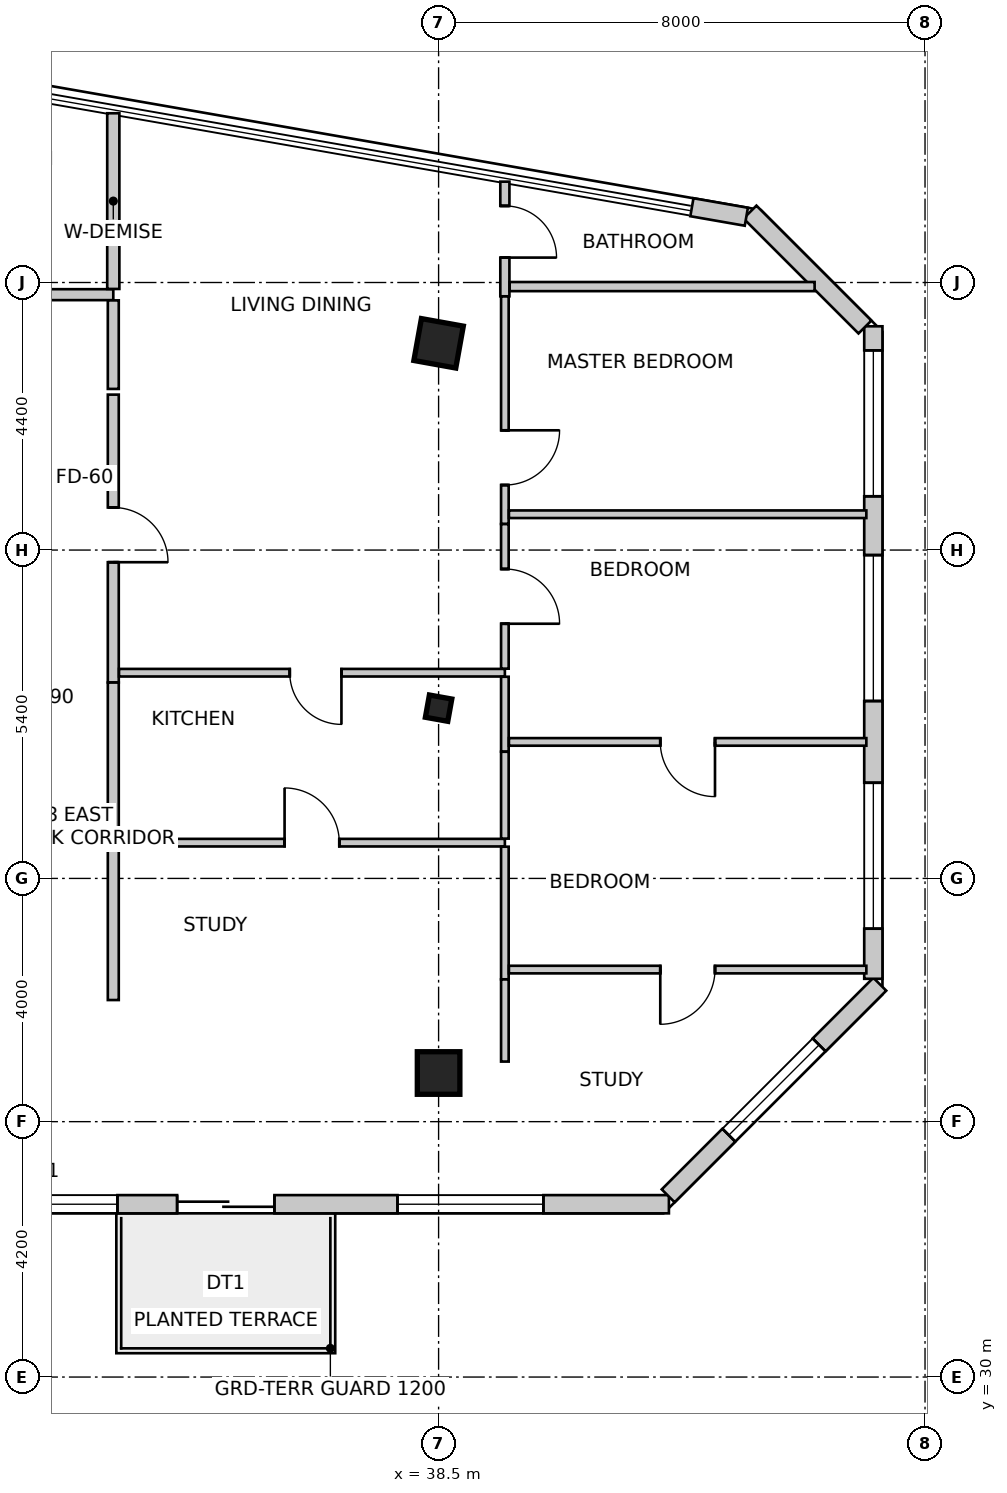
"""IFC4 building model, lengths in metres.
Left out: names, types, materials, properties, quantities, classifications, styles, units other than length and angle.
Written with IfcOpenShell. Run it as: python <this file> out.ifc"""

import sys

from ifc_helpers import new_model, si_unit, direction, frame, frame_2d, origin, origin_2d, place, context, subcontext, project, spatial, rectangle, i_section, extrude, source, transform, mapped, element, fill, save


model = new_model("IFC4")
c1 = context("Model", 3, precision=1e-05, world=origin(), true_north=direction((0.0, 1.0)))
c2 = subcontext(c1, "Body", "Model", "MODEL_VIEW")
j1 = project(units=[si_unit("LENGTHUNIT", "METRE"), si_unit("PLANEANGLEUNIT", "RADIAN")], contexts=[c1])
p1 = place(None, origin())
s1 = spatial("IfcSite", under=j1, at=p1, CompositionType="ELEMENT")
p2 = place(p1, origin())
s2 = spatial("IfcBuilding", under=s1, at=p2, CompositionType="ELEMENT")
p3 = place(p2, frame((0.0, 0.0, 228.9)))
s3 = spatial("IfcBuildingStorey", under=s2, at=p3, CompositionType="ELEMENT", Elevation=228.9)
m1 = source(origin(), c2, "Body", "SweptSolid", [
    extrude(rectangle(XDim=0.7, YDim=0.7, at=origin_2d()), origin(), (0.0, 0.0, 1.0), 3.5),
])
for number, where, z_axis, x_axis in (
    (1, (38.5, 47.0, 0.0), (0.0, 0.0, 1.0), (0.984, -0.177, 0.0)),
    (2, (38.5, 35.0, 0.0), (0.0, 0.0, 1.0), (1.0, 0.0, 0.0)),
):
    element("IfcColumn", number, at=place(p3, frame(where, z_axis=z_axis, x_axis=x_axis)), inside=s3, PredefinedType="COLUMN", context=c2, shape_type="MappedRepresentation", body=[
        mapped(m1, transform((0.0, 0.0, 0.0), scale=1.0)),
    ])
m2 = source(origin(), c2, "Body", "SweptSolid", [
    extrude(i_section(OverallWidth=0.374, OverallDepth=0.372, WebThickness=0.016, FlangeThickness=0.026, FilletRadius=0.015, at=origin_2d()), origin(), (0.0, 0.0, 1.0), 3.5),
])
p4 = place(p3, frame((38.5, 41.0, 0.0), z_axis=(0.0, 0.0, 1.0), x_axis=(0.984195607969, -0.17708474032, 0.0)))
e3 = element("IfcColumn", 3, at=p4, inside=s3, PredefinedType="COLUMN", context=c2, shape_type="MappedRepresentation", body=[
    mapped(m2, transform((0.0, 0.0, 0.0), scale=1.0)),
])
p5 = place(p3, frame((29.797, 32.842, 0.0), z_axis=(0.0, 0.0, 1.0), x_axis=(1.0, 0.0, 0.0)))
e4 = element("IfcWall", 4, at=p5, inside=s3, PredefinedType="SOLIDWALL", context=c2, shape_type="SweptSolid", body=[
    extrude(rectangle(XDim=12.491, YDim=0.3, at=frame_2d((6.245, 0.0))), origin(), (0.0, 0.0, 1.0), 3.25),
])
m3 = source(origin(), c2, "Body", "SweptSolid", [
    extrude(rectangle(XDim=1.6, YDim=2.15, at=frame_2d((0.8, 1.075))), frame((0.0, 0.16, 0.0), z_axis=(0.0, -1.0, 0.0), x_axis=(1.0, 0.0, 0.0)), (0.0, 0.0, 1.0), 0.32),
])
p6 = place(p5, frame((4.403, 0.0, 0.0)))
e5 = element("IfcOpeningElement", 5, at=p6, cuts=e4, PredefinedType="OPENING", context=c2, shape_type="MappedRepresentation", body=[
    mapped(m3, transform((0.0, 0.0, 0.0), scale=1.0)),
])
m4 = source(origin(), c2, "Body", "SweptSolid", [
    extrude(rectangle(XDim=2.4, YDim=2.2, at=frame_2d((1.2, 1.1))), frame((0.0, 0.16, 0.0), z_axis=(0.0, -1.0, 0.0), x_axis=(1.0, 0.0, 0.0)), (0.0, 0.0, 1.0), 0.32),
])
p7 = place(p5, frame((1.021, 0.0, 0.85)))
e6 = element("IfcOpeningElement", 6, at=p7, cuts=e4, PredefinedType="OPENING", context=c2, shape_type="MappedRepresentation", body=[
    mapped(m4, transform((0.0, 0.0, 0.0), scale=1.0)),
])
p8 = place(p5, frame((8.027, 0.0, 0.85)))
e7 = element("IfcOpeningElement", 7, at=p8, cuts=e4, PredefinedType="OPENING", context=c2, shape_type="MappedRepresentation", body=[
    mapped(m4, transform((0.0, 0.0, 0.0), scale=1.0)),
])
p9 = place(p3, frame((42.276, 32.98, 0.0), z_axis=(0.0, 0.0, 1.0), x_axis=(0.707106781187, 0.707106781187, 0.0)))
e8 = element("IfcWall", 8, at=p9, inside=s3, PredefinedType="SOLIDWALL", context=c2, shape_type="SweptSolid", body=[
    extrude(rectangle(XDim=4.922, YDim=0.3, at=frame_2d((2.461, 0.0))), origin(), (0.0, 0.0, 1.0), 3.25),
])
m5 = source(origin(), c2, "Body", "SweptSolid", [
    extrude(rectangle(XDim=2.1, YDim=2.0, at=frame_2d((1.05, 1.0))), frame((0.0, 0.16, 0.0), z_axis=(0.0, -1.0, 0.0), x_axis=(1.0, 0.0, 0.0)), (0.0, 0.0, 1.0), 0.32),
])
p10 = place(p9, frame((1.411, 0.0, 0.85)))
e9 = element("IfcOpeningElement", 9, at=p10, cuts=e8, PredefinedType="OPENING", context=c2, shape_type="MappedRepresentation", body=[
    mapped(m5, transform((0.0, 0.0, 0.0), scale=1.0)),
])
p11 = place(p3, frame((45.65, 36.549, 0.0), z_axis=(0.0, 0.0, 1.0), x_axis=(0.0, 1.0, 0.0)))
e10 = element("IfcWall", 10, at=p11, inside=s3, PredefinedType="SOLIDWALL", context=c2, shape_type="SweptSolid", body=[
    extrude(rectangle(XDim=10.73, YDim=0.3, at=frame_2d((5.365, 0.0))), origin(), (0.0, 0.0, 1.0), 3.25),
])
p12 = place(p11, frame((0.824, 0.0, 0.85)))
e11 = element("IfcOpeningElement", 11, at=p12, cuts=e10, PredefinedType="OPENING", context=c2, shape_type="MappedRepresentation", body=[
    mapped(m4, transform((0.0, 0.0, 0.0), scale=1.0)),
])
p13 = place(p11, frame((4.568, 0.0, 0.85)))
e12 = element("IfcOpeningElement", 12, at=p13, cuts=e10, PredefinedType="OPENING", context=c2, shape_type="MappedRepresentation", body=[
    mapped(m4, transform((0.0, 0.0, 0.0), scale=1.0)),
])
p14 = place(p11, frame((7.935, 0.0, 0.85)))
e13 = element("IfcOpeningElement", 13, at=p14, cuts=e10, PredefinedType="OPENING", context=c2, shape_type="MappedRepresentation", body=[
    mapped(m4, transform((0.0, 0.0, 0.0), scale=1.0)),
])
p15 = place(p3, frame((45.512, 47.268, 0.0), z_axis=(0.0, 0.0, 1.0), x_axis=(-0.707106781187, 0.707106781187, 0.0)))
e14 = element("IfcWall", 14, at=p15, inside=s3, PredefinedType="SOLIDWALL", context=c2, shape_type="SweptSolid", body=[
    extrude(rectangle(XDim=2.674, YDim=0.3, at=frame_2d((1.337, 0.0))), origin(), (0.0, 0.0, 1.0), 3.25),
])
p16 = place(p3, frame((43.561, 49.081, 0.0), z_axis=(0.0, 0.0, 1.0), x_axis=(-0.985063518612, 0.172191359539, 0.0)))
e15 = element("IfcWall", 15, at=p16, inside=s3, PredefinedType="SOLIDWALL", context=c2, shape_type="SweptSolid", body=[
    extrude(rectangle(XDim=0.909, YDim=0.3, at=frame_2d((0.455, 0.0))), origin(), (0.0, 0.0, 1.0), 3.25),
])
p17 = place(p3, frame((28.362, 47.8, 0.0), z_axis=(0.0, 0.0, 1.0), x_axis=(1.0, 0.0, 0.0)))
e16 = element("IfcWall", 16, at=p17, inside=s3, PredefinedType="PARTITIONING", context=c2, shape_type="SweptSolid", body=[
    extrude(rectangle(XDim=4.788, YDim=0.18, at=frame_2d((2.394, 0.0))), origin(), (0.0, 0.0, 1.0), 2.779),
])
m6 = source(origin(), c2, "Body", "SweptSolid", [
    extrude(rectangle(XDim=0.85, YDim=2.15, at=frame_2d((0.425, 1.075))), frame((0.0, 0.1, 0.0), z_axis=(0.0, -1.0, 0.0), x_axis=(1.0, 0.0, 0.0)), (0.0, 0.0, 1.0), 0.2),
])
p18 = place(p17, frame((0.401, 0.0, 0.0)))
e17 = element("IfcOpeningElement", 17, at=p18, cuts=e16, PredefinedType="OPENING", context=c2, shape_type="MappedRepresentation", body=[
    mapped(m6, transform((0.0, 0.0, 0.0), scale=1.0)),
])
p19 = place(p3, frame((33.15, 47.706, 0.0), z_axis=(0.0, 0.0, 1.0), x_axis=(0.0, -1.0, 0.0)))
e18 = element("IfcWall", 18, at=p19, inside=s3, PredefinedType="PARTITIONING", context=c2, shape_type="SweptSolid", body=[
    extrude(rectangle(XDim=1.456, YDim=0.18, at=frame_2d((0.728, 0.0))), origin(), (0.0, 0.0, 1.0), 2.919),
])
p20 = place(p3, frame((33.15, 38.948, 0.0), z_axis=(0.0, 0.0, 1.0), x_axis=(0.0, -1.0, 0.0)))
e19 = element("IfcWall", 19, at=p20, inside=s3, PredefinedType="PARTITIONING", context=c2, shape_type="SweptSolid", body=[
    extrude(rectangle(XDim=2.748, YDim=0.18, at=frame_2d((1.374, 0.0))), origin(), (0.0, 0.0, 1.0), 3.25),
])
p21 = place(p3, frame((33.15, 46.156, 0.0), z_axis=(0.0, 0.0, 1.0), x_axis=(0.0, -1.0, 0.0)))
e20 = element("IfcWall", 20, at=p21, inside=s3, PredefinedType="PARTITIONING", context=c2, shape_type="SweptSolid", body=[
    extrude(rectangle(XDim=4.733, YDim=0.18, at=frame_2d((2.366, 0.0))), origin(), (0.0, 0.0, 1.0), 2.779),
])
m7 = source(origin(), c2, "Body", "SweptSolid", [
    extrude(rectangle(XDim=0.9, YDim=2.15, at=frame_2d((0.45, 1.075))), frame((0.0, 0.1, 0.0), z_axis=(0.0, -1.0, 0.0), x_axis=(1.0, 0.0, 0.0)), (0.0, 0.0, 1.0), 0.2),
])
p22 = place(p21, frame((1.856, 0.0, 0.0)))
e21 = element("IfcOpeningElement", 21, at=p22, cuts=e20, PredefinedType="OPENING", context=c2, shape_type="MappedRepresentation", body=[
    mapped(m7, transform((0.0, 0.0, 0.0), scale=1.0)),
])
p23 = place(p3, frame((33.15, 41.421, 0.0), z_axis=(0.0, 0.0, 1.0), x_axis=(0.0, -1.0, 0.0)))
e22 = element("IfcWall", 22, at=p23, inside=s3, PredefinedType="PARTITIONING", context=c2, shape_type="SweptSolid", body=[
    extrude(rectangle(XDim=2.471, YDim=0.18, at=frame_2d((1.235, 0.0))), origin(), (0.0, 0.0, 1.0), 3.25),
])
p24 = place(p3, frame((33.15, 50.783, 0.0), z_axis=(0.0, 0.0, 1.0), x_axis=(0.0, -1.0, 0.0)))
e23 = element("IfcWall", 23, at=p24, inside=s3, PredefinedType="PARTITIONING", context=c2, shape_type="SweptSolid", body=[
    extrude(rectangle(XDim=2.889, YDim=0.2, at=frame_2d((1.445, 0.0))), origin(), (0.0, 0.0, 1.0), 2.542),
])
p25 = place(p3, frame((33.244, 38.788, 0.0), z_axis=(0.0, 0.0, 1.0), x_axis=(1.0, 0.0, 0.0)))
e24 = element("IfcWall", 24, at=p25, inside=s3, PredefinedType="PARTITIONING", context=c2, shape_type="SweptSolid", body=[
    extrude(rectangle(XDim=6.346, YDim=0.125, at=frame_2d((3.173, 0.0))), origin(), (0.0, 0.0, 1.0), 2.766),
])
m8 = source(origin(), c2, "Body", "SweptSolid", [
    extrude(rectangle(XDim=0.9, YDim=2.15, at=frame_2d((0.45, 1.075))), frame((0.0, 0.073, 0.0), z_axis=(0.0, -1.0, 0.0), x_axis=(1.0, 0.0, 0.0)), (0.0, 0.0, 1.0), 0.145),
])
p26 = place(p25, frame((2.723, 0.0, 0.0)))
e25 = element("IfcOpeningElement", 25, at=p26, cuts=e24, PredefinedType="OPENING", context=c2, shape_type="MappedRepresentation", body=[
    mapped(m8, transform((0.0, 0.0, 0.0), scale=1.0)),
])
p27 = place(p3, frame((39.59, 38.721, 0.0), z_axis=(0.0, 0.0, 1.0), x_axis=(0.0, -1.0, 0.0)))
e26 = element("IfcWall", 26, at=p27, inside=s3, PredefinedType="PARTITIONING", context=c2, shape_type="SweptSolid", body=[
    extrude(rectangle(XDim=2.18, YDim=0.125, at=frame_2d((1.09, 0.0))), origin(), (0.0, 0.0, 1.0), 3.25),
])
p28 = place(p3, frame((39.59, 36.539, 0.0), z_axis=(0.0, 0.0, 1.0), x_axis=(0.0, -1.0, 0.0)))
e27 = element("IfcWall", 27, at=p28, inside=s3, PredefinedType="PARTITIONING", context=c2, shape_type="SweptSolid", body=[
    extrude(rectangle(XDim=1.351, YDim=0.125, at=frame_2d((0.676, 0.0))), origin(), (0.0, 0.0, 1.0), 3.25),
])
p29 = place(p3, frame((39.59, 41.583, 0.0), z_axis=(0.0, 0.0, 1.0), x_axis=(-1.0, 0.0, 0.0)))
e28 = element("IfcWall", 28, at=p29, inside=s3, PredefinedType="PARTITIONING", context=c2, shape_type="SweptSolid", body=[
    extrude(rectangle(XDim=6.346, YDim=0.125, at=frame_2d((3.173, 0.0))), origin(), (0.0, 0.0, 1.0), 2.766),
])
m9 = source(origin(), c2, "Body", "SweptSolid", [
    extrude(rectangle(XDim=0.85, YDim=2.15, at=frame_2d((0.425, 1.075))), frame((0.0, 0.073, 0.0), z_axis=(0.0, -1.0, 0.0), x_axis=(1.0, 0.0, 0.0)), (0.0, 0.0, 1.0), 0.145),
])
p30 = place(p29, frame((2.688, 0.0, 0.0)))
e29 = element("IfcOpeningElement", 29, at=p30, cuts=e28, PredefinedType="OPENING", context=c2, shape_type="MappedRepresentation", body=[
    mapped(m9, transform((0.0, 0.0, 0.0), scale=1.0)),
])
p31 = place(p3, frame((39.59, 49.658, 0.0), z_axis=(0.0, 0.0, 1.0), x_axis=(0.0, -1.0, 0.0)))
e30 = element("IfcWall", 30, at=p31, inside=s3, PredefinedType="PARTITIONING", context=c2, shape_type="SweptSolid", body=[
    extrude(rectangle(XDim=1.885, YDim=0.15, at=frame_2d((0.943, 0.0))), origin(), (0.0, 0.0, 1.0), 3.25),
])
m10 = source(origin(), c2, "Body", "SweptSolid", [
    extrude(rectangle(XDim=0.85, YDim=2.15, at=frame_2d((0.425, 1.075))), frame((0.0, 0.085, 0.0), z_axis=(0.0, -1.0, 0.0), x_axis=(1.0, 0.0, 0.0)), (0.0, 0.0, 1.0), 0.17),
])
p32 = place(p31, frame((0.399, 0.0, 0.0)))
e31 = element("IfcOpeningElement", 31, at=p32, cuts=e30, PredefinedType="OPENING", context=c2, shape_type="MappedRepresentation", body=[
    mapped(m10, transform((0.0, 0.0, 0.0), scale=1.0)),
])
p33 = place(p3, frame((39.59, 47.771, 0.0), z_axis=(0.0, 0.0, 1.0), x_axis=(0.0, -1.0, 0.0)))
e32 = element("IfcWall", 32, at=p33, inside=s3, PredefinedType="PARTITIONING", context=c2, shape_type="SweptSolid", body=[
    extrude(rectangle(XDim=3.742, YDim=0.125, at=frame_2d((1.871, 0.0))), origin(), (0.0, 0.0, 1.0), 3.25),
])
p34 = place(p33, frame((2.202, 0.0, 0.0)))
e33 = element("IfcOpeningElement", 33, at=p34, cuts=e32, PredefinedType="OPENING", context=c2, shape_type="MappedRepresentation", body=[
    mapped(m8, transform((0.0, 0.0, 0.0), scale=1.0)),
])
p35 = place(p3, frame((39.59, 44.027, 0.0), z_axis=(0.0, 0.0, 1.0), x_axis=(0.0, -1.0, 0.0)))
e34 = element("IfcWall", 34, at=p35, inside=s3, PredefinedType="PARTITIONING", context=c2, shape_type="SweptSolid", body=[
    extrude(rectangle(XDim=2.378, YDim=0.125, at=frame_2d((1.189, 0.0))), origin(), (0.0, 0.0, 1.0), 3.25),
])
p36 = place(p35, frame((0.739, 0.0, 0.0)))
e35 = element("IfcOpeningElement", 35, at=p36, cuts=e34, PredefinedType="OPENING", context=c2, shape_type="MappedRepresentation", body=[
    mapped(m8, transform((0.0, 0.0, 0.0), scale=1.0)),
])
p37 = place(p3, frame((39.59, 41.517, 0.0), z_axis=(0.0, 0.0, 1.0), x_axis=(0.0, -1.0, 0.0)))
e36 = element("IfcWall", 36, at=p37, inside=s3, PredefinedType="PARTITIONING", context=c2, shape_type="SweptSolid", body=[
    extrude(rectangle(XDim=1.232, YDim=0.125, at=frame_2d((0.616, 0.0))), origin(), (0.0, 0.0, 1.0), 3.25),
])
p38 = place(p3, frame((39.59, 40.283, 0.0), z_axis=(0.0, 0.0, 1.0), x_axis=(0.0, -1.0, 0.0)))
e37 = element("IfcWall", 37, at=p38, inside=s3, PredefinedType="PARTITIONING", context=c2, shape_type="SweptSolid", body=[
    extrude(rectangle(XDim=1.428, YDim=0.125, at=frame_2d((0.714, 0.0))), origin(), (0.0, 0.0, 1.0), 3.25),
])
p39 = place(p3, frame((44.684, 47.933, 0.0), z_axis=(0.0, 0.0, 1.0), x_axis=(-1.0, 0.0, 0.0)))
e38 = element("IfcWall", 38, at=p39, inside=s3, PredefinedType="PARTITIONING", context=c2, shape_type="SweptSolid", body=[
    extrude(rectangle(XDim=5.015, YDim=0.15, at=frame_2d((2.508, 0.0))), origin(), (0.0, 0.0, 1.0), 3.25),
])
p40 = place(p3, frame((45.535, 44.189, 0.0), z_axis=(0.0, 0.0, 1.0), x_axis=(-1.0, 0.0, 0.0)))
e39 = element("IfcWall", 39, at=p40, inside=s3, PredefinedType="PARTITIONING", context=c2, shape_type="SweptSolid", body=[
    extrude(rectangle(XDim=5.878, YDim=0.125, at=frame_2d((2.939, 0.0))), origin(), (0.0, 0.0, 1.0), 3.25),
])
p41 = place(p3, frame((45.535, 40.445, 0.0), z_axis=(0.0, 0.0, 1.0), x_axis=(-1.0, 0.0, 0.0)))
e40 = element("IfcWall", 40, at=p41, inside=s3, PredefinedType="PARTITIONING", context=c2, shape_type="SweptSolid", body=[
    extrude(rectangle(XDim=5.878, YDim=0.125, at=frame_2d((2.939, 0.0))), origin(), (0.0, 0.0, 1.0), 3.25),
])
p42 = place(p41, frame((2.489, 0.0, 0.0)))
e41 = element("IfcOpeningElement", 41, at=p42, cuts=e40, PredefinedType="OPENING", context=c2, shape_type="MappedRepresentation", body=[
    mapped(m8, transform((0.0, 0.0, 0.0), scale=1.0)),
])
p43 = place(p3, frame((45.535, 36.701, 0.0), z_axis=(0.0, 0.0, 1.0), x_axis=(-1.0, 0.0, 0.0)))
e42 = element("IfcWall", 42, at=p43, inside=s3, PredefinedType="PARTITIONING", context=c2, shape_type="SweptSolid", body=[
    extrude(rectangle(XDim=5.878, YDim=0.125, at=frame_2d((2.939, 0.0))), origin(), (0.0, 0.0, 1.0), 3.25),
])
p44 = place(p43, frame((2.489, 0.0, 0.0)))
e43 = element("IfcOpeningElement", 43, at=p44, cuts=e42, PredefinedType="OPENING", context=c2, shape_type="MappedRepresentation", body=[
    mapped(m8, transform((0.0, 0.0, 0.0), scale=1.0)),
])
m11 = source(origin(), c2, "Body", "SweptSolid", [
    extrude(rectangle(XDim=1.6, YDim=2.15, at=frame_2d((0.8, 1.075))), frame((0.0, 0.025, 0.0), z_axis=(0.0, -1.0, 0.0), x_axis=(1.0, 0.0, 0.0)), (0.0, 0.0, 1.0), 0.05),
])
p45 = place(p6, origin())
e44 = element("IfcDoor", 44, at=p45, inside=s3, OperationType="DOUBLE_DOOR_SLIDING", PredefinedType="DOOR", context=c2, shape_type="MappedRepresentation", body=[
    mapped(m11, transform((0.0, 0.0, 0.0), scale=1.0)),
])
fill(e5, e44)
m12 = source(origin(), c2, "Body", "SweptSolid", [
    extrude(rectangle(XDim=2.4, YDim=2.2, at=frame_2d((1.2, 1.1))), frame((0.0, -0.015, 0.0), z_axis=(0.0, -1.0, 0.0), x_axis=(1.0, 0.0, 0.0)), (0.0, 0.0, 1.0), 0.06),
])
p46 = place(p7, origin())
e45 = element("IfcWindow", 45, at=p46, inside=s3, PartitioningType="SINGLE_PANEL", PredefinedType="WINDOW", context=c2, shape_type="MappedRepresentation", body=[
    mapped(m12, transform((0.0, 0.0, 0.0), scale=1.0)),
])
fill(e6, e45)
p47 = place(p8, origin())
e46 = element("IfcWindow", 46, at=p47, inside=s3, PartitioningType="SINGLE_PANEL", PredefinedType="WINDOW", context=c2, shape_type="MappedRepresentation", body=[
    mapped(m12, transform((0.0, 0.0, 0.0), scale=1.0)),
])
fill(e7, e46)
m13 = source(origin(), c2, "Body", "SweptSolid", [
    extrude(rectangle(XDim=2.1, YDim=2.0, at=frame_2d((1.05, 1.0))), frame((0.0, -0.015, 0.0), z_axis=(0.0, -1.0, 0.0), x_axis=(1.0, 0.0, 0.0)), (0.0, 0.0, 1.0), 0.06),
])
p48 = place(p10, origin())
e47 = element("IfcWindow", 47, at=p48, inside=s3, PartitioningType="SINGLE_PANEL", PredefinedType="WINDOW", context=c2, shape_type="MappedRepresentation", body=[
    mapped(m13, transform((0.0, 0.0, 0.0), scale=1.0)),
])
fill(e9, e47)
p49 = place(p12, origin())
e48 = element("IfcWindow", 48, at=p49, inside=s3, PartitioningType="SINGLE_PANEL", PredefinedType="WINDOW", context=c2, shape_type="MappedRepresentation", body=[
    mapped(m12, transform((0.0, 0.0, 0.0), scale=1.0)),
])
fill(e11, e48)
p50 = place(p13, origin())
e49 = element("IfcWindow", 49, at=p50, inside=s3, PartitioningType="SINGLE_PANEL", PredefinedType="WINDOW", context=c2, shape_type="MappedRepresentation", body=[
    mapped(m12, transform((0.0, 0.0, 0.0), scale=1.0)),
])
fill(e12, e49)
p51 = place(p14, origin())
e50 = element("IfcWindow", 50, at=p51, inside=s3, PartitioningType="SINGLE_PANEL", PredefinedType="WINDOW", context=c2, shape_type="MappedRepresentation", body=[
    mapped(m12, transform((0.0, 0.0, 0.0), scale=1.0)),
])
fill(e13, e50)
m14 = source(origin(), c2, "Body", "SweptSolid", [
    extrude(rectangle(XDim=0.9, YDim=2.15, at=frame_2d((0.45, 1.075))), frame((0.0, 0.025, 0.0), z_axis=(0.0, -1.0, 0.0), x_axis=(1.0, 0.0, 0.0)), (0.0, 0.0, 1.0), 0.05),
])
p52 = place(p26, origin())
e51 = element("IfcDoor", 51, at=p52, inside=s3, OperationType="SINGLE_SWING_LEFT", PredefinedType="DOOR", context=c2, shape_type="MappedRepresentation", body=[
    mapped(m14, transform((0.0, 0.0, 0.0), scale=1.0)),
])
fill(e25, e51)
m15 = source(origin(), c2, "Body", "SweptSolid", [
    extrude(rectangle(XDim=0.9, YDim=2.15, at=frame_2d((0.45, 1.075))), frame((0.0, 0.025, 0.0), z_axis=(0.0, -1.0, 0.0), x_axis=(1.0, 0.0, 0.0)), (0.0, 0.0, 1.0), 0.05),
])
p53 = place(p22, origin())
e52 = element("IfcDoor", 52, at=p53, inside=s3, OperationType="SINGLE_SWING_RIGHT", PredefinedType="DOOR", context=c2, shape_type="MappedRepresentation", body=[
    mapped(m15, transform((0.0, 0.0, 0.0), scale=1.0)),
])
fill(e21, e52)
m16 = source(origin(), c2, "Body", "SweptSolid", [
    extrude(rectangle(XDim=0.85, YDim=2.15, at=frame_2d((0.425, 1.075))), frame((0.0, 0.025, 0.0), z_axis=(0.0, -1.0, 0.0), x_axis=(1.0, 0.0, 0.0)), (0.0, 0.0, 1.0), 0.05),
])
p54 = place(p30, origin())
e53 = element("IfcDoor", 53, at=p54, inside=s3, OperationType="SINGLE_SWING_LEFT", PredefinedType="DOOR", context=c2, shape_type="MappedRepresentation", body=[
    mapped(m16, transform((0.0, 0.0, 0.0), scale=1.0)),
])
fill(e29, e53)
p55 = place(p32, origin())
e54 = element("IfcDoor", 54, at=p55, inside=s3, OperationType="SINGLE_SWING_RIGHT", PredefinedType="DOOR", context=c2, shape_type="MappedRepresentation", body=[
    mapped(m16, transform((0.0, 0.0, 0.0), scale=1.0)),
])
fill(e31, e54)
p56 = place(p34, origin())
e55 = element("IfcDoor", 55, at=p56, inside=s3, OperationType="SINGLE_SWING_LEFT", PredefinedType="DOOR", context=c2, shape_type="MappedRepresentation", body=[
    mapped(m14, transform((0.0, 0.0, 0.0), scale=1.0)),
])
fill(e33, e55)
p57 = place(p36, origin())
e56 = element("IfcDoor", 56, at=p57, inside=s3, OperationType="SINGLE_SWING_RIGHT", PredefinedType="DOOR", context=c2, shape_type="MappedRepresentation", body=[
    mapped(m14, transform((0.0, 0.0, 0.0), scale=1.0)),
])
fill(e35, e56)
p58 = place(p42, origin())
e57 = element("IfcDoor", 57, at=p58, inside=s3, OperationType="SINGLE_SWING_LEFT", PredefinedType="DOOR", context=c2, shape_type="MappedRepresentation", body=[
    mapped(m14, transform((0.0, 0.0, 0.0), scale=1.0)),
])
fill(e41, e57)
p59 = place(p44, origin())
e58 = element("IfcDoor", 58, at=p59, inside=s3, OperationType="SINGLE_SWING_RIGHT", PredefinedType="DOOR", context=c2, shape_type="MappedRepresentation", body=[
    mapped(m14, transform((0.0, 0.0, 0.0), scale=1.0)),
])
fill(e43, e58)
save(model, sys.argv[1])
